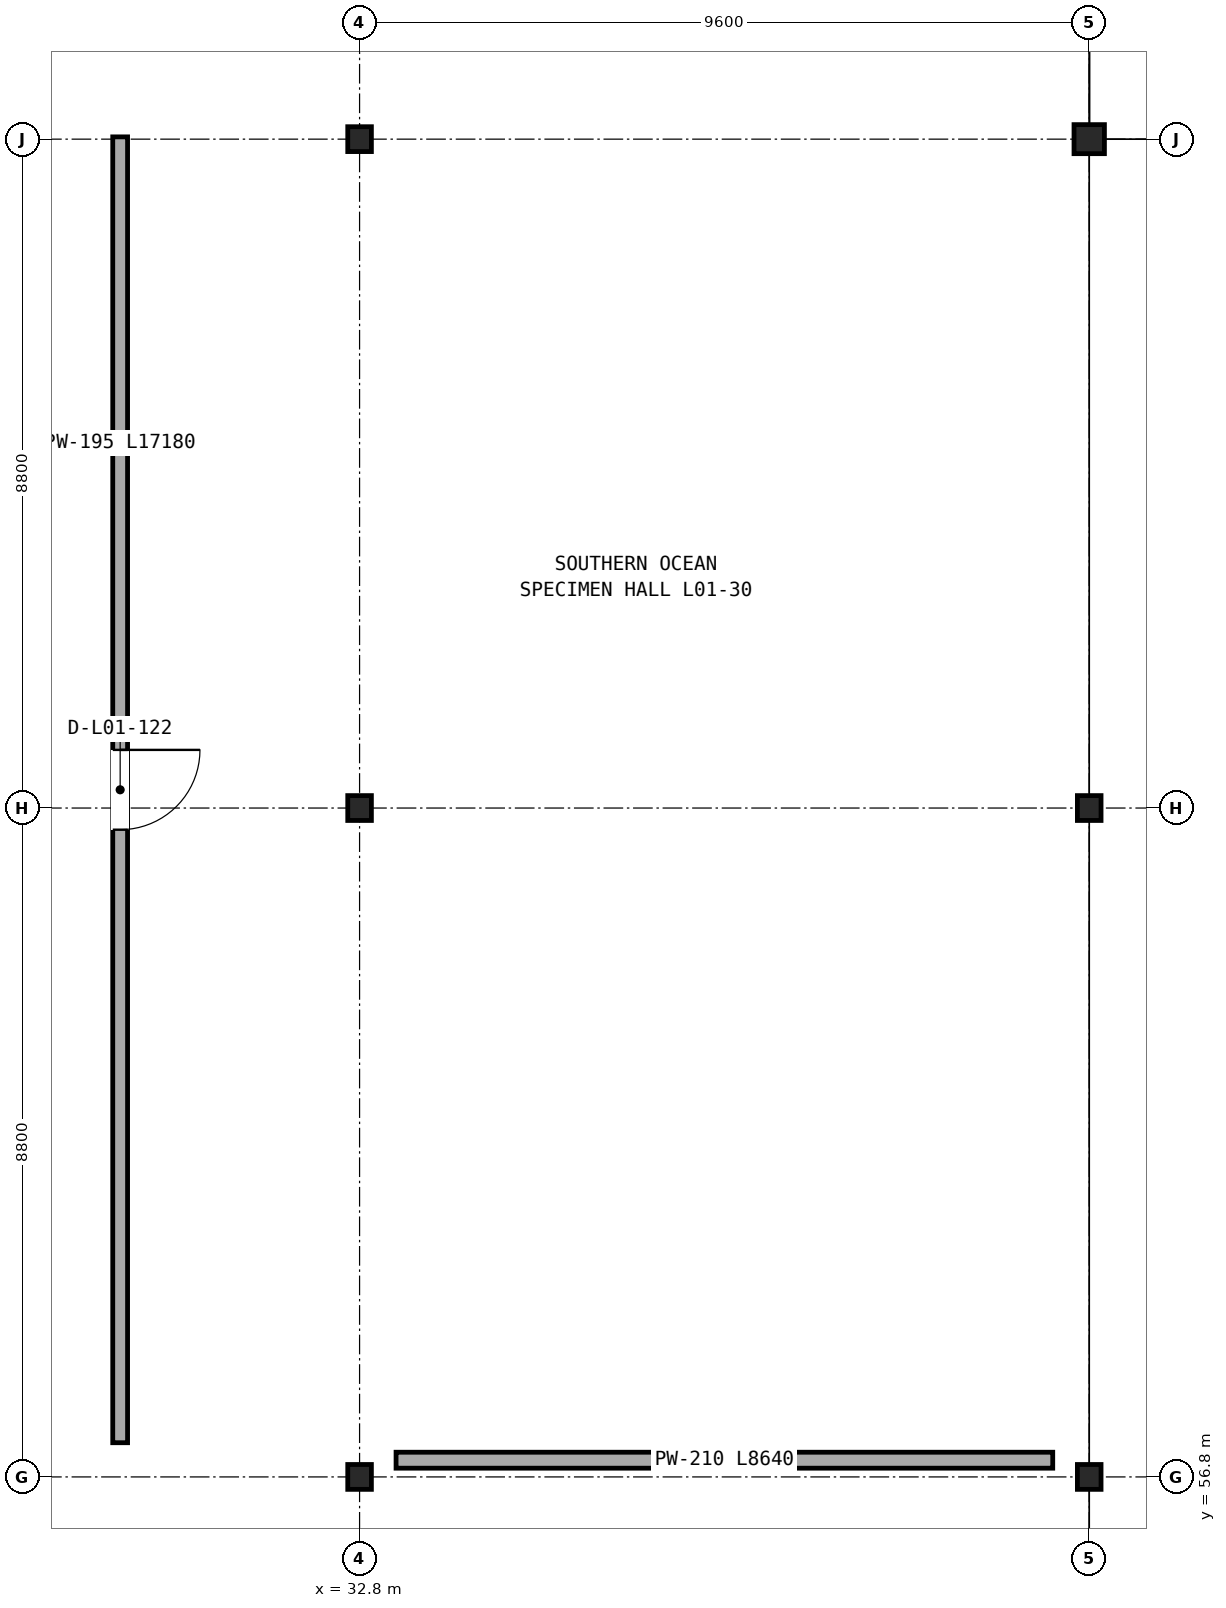
"""IFC4 building model, lengths in metres.
Left out: names, types, materials, properties, quantities, classifications, styles, units other than length and angle.
Written with IfcOpenShell. Run it as: python <this file> out.ifc"""

import sys

from ifc_helpers import new_model, si_unit, direction, frame, frame_2d, origin, origin_2d, place, context, subcontext, project, spatial, rectangle, i_section, extrude, element, fill, save


model = new_model("IFC4")
c1 = context("Model", 3, precision=1e-05, world=origin(), true_north=direction((0.0, 1.0)))
c2 = subcontext(c1, "Body", "Model", "MODEL_VIEW")
j1 = project(units=[si_unit("LENGTHUNIT", "METRE"), si_unit("PLANEANGLEUNIT", "RADIAN")], contexts=[c1])
p1 = place(None, origin())
s1 = spatial("IfcSite", under=j1, at=p1, CompositionType="ELEMENT")
p2 = place(p1, origin())
s2 = spatial("IfcBuilding", under=s1, at=p2, CompositionType="ELEMENT")
p3 = place(p2, frame((0.0, 0.0, 5.6)))
s3 = spatial("IfcBuildingStorey", under=s2, at=p3, CompositionType="ELEMENT", Elevation=5.6)
for number, where, z_axis, x_axis in (
    (1, (32.8, 56.8, 0.0), (0.0, 0.0, 1.0), (1.0, 0.0, 0.0)),
    (2, (32.8, 65.6, 0.0), (0.0, 0.0, 1.0), (1.0, 0.0, 0.0)),
    (3, (32.8, 74.4, 0.0), (0.0, 0.0, 1.0), (1.0, 0.0, 0.0)),
    (4, (42.4, 56.8, 0.0), (0.0, 0.0, 1.0), (1.0, 0.0, 0.0)),
    (5, (42.4, 65.6, 0.0), (0.0, 0.0, 1.0), (1.0, 0.0, 0.0)),
):
    element("IfcColumn", number, at=place(p3, frame(where, z_axis=z_axis, x_axis=x_axis)), inside=s3, PredefinedType="COLUMN", context=c2, shape_type="SweptSolid", body=[
        extrude(i_section(OverallWidth=0.311, OverallDepth=0.327, WebThickness=0.016, FlangeThickness=0.025, FilletRadius=0.017, at=origin_2d()), origin(), (0.0, 0.0, 1.0), 4.5),
    ])
p4 = place(p3, frame((42.4, 74.4, 0.0), z_axis=(0.0, 0.0, 1.0), x_axis=(1.0, 0.0, 0.0)))
e6 = element("IfcColumn", 6, at=p4, inside=s3, PredefinedType="COLUMN", context=c2, shape_type="SweptSolid", body=[
    extrude(i_section(OverallWidth=0.4, OverallDepth=0.382, WebThickness=0.025, FlangeThickness=0.036, at=origin_2d()), origin(), (0.0, 0.0, 1.0), 4.5),
])
p5 = place(p3, frame((29.65, 57.25, 0.0), z_axis=(0.0, 0.0, 1.0), x_axis=(0.0, 1.0, 0.0)))
e7 = element("IfcWall", 7, at=p5, inside=s3, PredefinedType="PARTITIONING", context=c2, shape_type="SweptSolid", body=[
    extrude(rectangle(XDim=17.18, YDim=0.195, at=frame_2d((8.59, 0.0))), origin(), (0.0, 0.0, 1.0), 3.19),
])
p6 = place(p5, frame((8.065, 0.0, 0.0)))
e8 = element("IfcOpeningElement", 8, at=p6, cuts=e7, PredefinedType="OPENING", context=c2, shape_type="SweptSolid", body=[
    extrude(rectangle(XDim=1.05, YDim=2.15, at=frame_2d((0.525, 1.075))), frame((0.0, 0.107, 0.0), z_axis=(0.0, -1.0, 0.0), x_axis=(1.0, 0.0, 0.0)), (0.0, 0.0, 1.0), 0.215),
])
p7 = place(p3, frame((41.92, 57.02, 0.0), z_axis=(0.0, 0.0, 1.0), x_axis=(-1.0, 0.0, 0.0)))
e9 = element("IfcWall", 9, at=p7, inside=s3, PredefinedType="PARTITIONING", context=c2, shape_type="SweptSolid", body=[
    extrude(rectangle(XDim=8.64, YDim=0.21, at=frame_2d((4.32, 0.0))), origin(), (0.0, 0.0, 1.0), 3.583),
])
p8 = place(p6, frame((1.05, 0.0, 0.0), z_axis=(0.0, 0.0, 1.0), x_axis=(-1.0, 0.0, 0.0)))
e10 = element("IfcDoor", 10, at=p8, inside=s3, OperationType="SINGLE_SWING_RIGHT", PredefinedType="DOOR", context=c2, shape_type="SweptSolid", body=[
    extrude(rectangle(XDim=1.05, YDim=2.15, at=frame_2d((0.525, 1.075))), frame((0.0, 0.025, 0.0), z_axis=(0.0, -1.0, 0.0), x_axis=(1.0, 0.0, 0.0)), (0.0, 0.0, 1.0), 0.05),
])
fill(e8, e10)
save(model, sys.argv[1])
